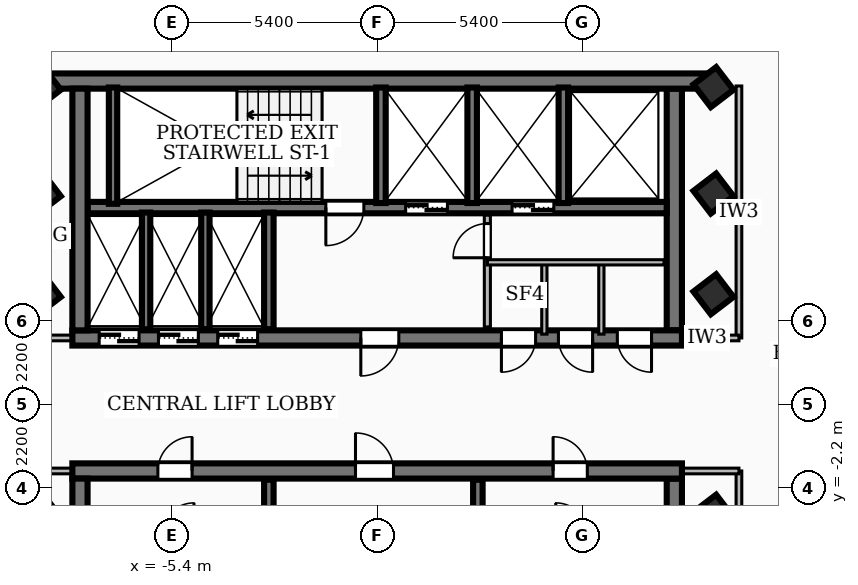
"""IFC4 building model, lengths in metres.
Left out: names, types, materials, properties, quantities, classifications, styles, units other than length and angle.
Written with IfcOpenShell. Run it as: python <this file> out.ifc"""

import sys

from ifc_helpers import new_model, si_unit, direction, frame, frame_2d, origin, origin_2d, place, context, subcontext, project, spatial, rectangle, extrude, element, fill, save


model = new_model("IFC4")
c1 = context("Model", 3, precision=1e-05, world=origin(), true_north=direction((0.0, 1.0)))
c2 = subcontext(c1, "Body", "Model", "MODEL_VIEW")
j1 = project(units=[si_unit("LENGTHUNIT", "METRE"), si_unit("PLANEANGLEUNIT", "RADIAN")], contexts=[c1])
p1 = place(None, origin())
s1 = spatial("IfcSite", under=j1, at=p1, CompositionType="ELEMENT")
p2 = place(p1, origin())
s2 = spatial("IfcBuilding", under=s1, at=p2, CompositionType="ELEMENT")
p3 = place(p2, frame((0.0, 0.0, 229.14)))
s3 = spatial("IfcBuildingStorey", under=s2, at=p3, CompositionType="ELEMENT", Elevation=229.14)
p4 = place(p3, frame((-8.78, 8.51, 0.0), z_axis=(0.0, 0.0, 1.0), x_axis=(1.0, 0.0, 0.0)))
e1 = element("IfcWall", 1, at=p4, inside=s3, PredefinedType="SHEAR", context=c2, shape_type="SweptSolid", body=[
    extrude(rectangle(XDim=17.56, YDim=0.4, at=frame_2d((8.78, 0.0))), origin(), (0.0, 0.0, 1.0), 3.14),
])
p5 = place(p3, frame((8.02, 1.75, 0.0), z_axis=(0.0, 0.0, 1.0), x_axis=(-1.0, 0.0, 0.0)))
e2 = element("IfcWall", 2, at=p5, inside=s3, PredefinedType="SHEAR", context=c2, shape_type="SweptSolid", body=[
    extrude(rectangle(XDim=16.04, YDim=0.4, at=frame_2d((8.02, 0.0))), origin(), (0.0, 0.0, 1.0), 3.14),
])
p6 = place(p5, frame((7.45, 0.0, 0.0)))
e3 = element("IfcOpeningElement", 3, at=p6, cuts=e2, PredefinedType="OPENING", context=c2, shape_type="SweptSolid", body=[
    extrude(rectangle(XDim=1.0, YDim=2.1, at=frame_2d((0.5, 1.05))), frame((0.0, 0.21, 0.0), z_axis=(0.0, -1.0, 0.0), x_axis=(1.0, 0.0, 0.0)), (0.0, 0.0, 1.0), 0.42),
])
p7 = place(p5, frame((14.285, 0.0, 0.0)))
e4 = element("IfcOpeningElement", 4, at=p7, cuts=e2, PredefinedType="OPENING", context=c2, shape_type="SweptSolid", body=[
    extrude(rectangle(XDim=1.05, YDim=2.15, at=frame_2d((0.525, 1.075))), frame((0.0, 0.21, 0.0), z_axis=(0.0, -1.0, 0.0), x_axis=(1.0, 0.0, 0.0)), (0.0, 0.0, 1.0), 0.42),
])
p8 = place(p5, frame((12.725, 0.0, 0.0)))
e5 = element("IfcOpeningElement", 5, at=p8, cuts=e2, PredefinedType="OPENING", context=c2, shape_type="SweptSolid", body=[
    extrude(rectangle(XDim=1.05, YDim=2.15, at=frame_2d((0.525, 1.075))), frame((0.0, 0.21, 0.0), z_axis=(0.0, -1.0, 0.0), x_axis=(1.0, 0.0, 0.0)), (0.0, 0.0, 1.0), 0.42),
])
p9 = place(p5, frame((11.165, 0.0, 0.0)))
e6 = element("IfcOpeningElement", 6, at=p9, cuts=e2, PredefinedType="OPENING", context=c2, shape_type="SweptSolid", body=[
    extrude(rectangle(XDim=1.05, YDim=2.15, at=frame_2d((0.525, 1.075))), frame((0.0, 0.21, 0.0), z_axis=(0.0, -1.0, 0.0), x_axis=(1.0, 0.0, 0.0)), (0.0, 0.0, 1.0), 0.42),
])
p10 = place(p5, frame((3.85, 0.0, 0.0)))
e7 = element("IfcOpeningElement", 7, at=p10, cuts=e2, PredefinedType="OPENING", context=c2, shape_type="SweptSolid", body=[
    extrude(rectangle(XDim=0.9, YDim=2.06, at=frame_2d((0.45, 1.03))), frame((0.0, 0.21, 0.0), z_axis=(0.0, -1.0, 0.0), x_axis=(1.0, 0.0, 0.0)), (0.0, 0.0, 1.0), 0.42),
])
p11 = place(p5, frame((2.35, 0.0, 0.0)))
e8 = element("IfcOpeningElement", 8, at=p11, cuts=e2, PredefinedType="OPENING", context=c2, shape_type="SweptSolid", body=[
    extrude(rectangle(XDim=0.9, YDim=2.06, at=frame_2d((0.45, 1.03))), frame((0.0, 0.21, 0.0), z_axis=(0.0, -1.0, 0.0), x_axis=(1.0, 0.0, 0.0)), (0.0, 0.0, 1.0), 0.42),
])
p12 = place(p5, frame((0.8, 0.0, 0.0)))
e9 = element("IfcOpeningElement", 9, at=p12, cuts=e2, PredefinedType="OPENING", context=c2, shape_type="SweptSolid", body=[
    extrude(rectangle(XDim=0.9, YDim=2.06, at=frame_2d((0.45, 1.03))), frame((0.0, 0.21, 0.0), z_axis=(0.0, -1.0, 0.0), x_axis=(1.0, 0.0, 0.0)), (0.0, 0.0, 1.0), 0.42),
])
for number, where, z_axis, x_axis in (
    (10, (-7.82, 1.95, 0.0), (0.0, 0.0, 1.0), (0.0, 1.0, 0.0)),
    (11, (7.82, 8.31, 0.0), (0.0, 0.0, 1.0), (0.0, -1.0, 0.0)),
):
    element("IfcWall", number, at=place(p3, frame(where, z_axis=z_axis, x_axis=x_axis)), inside=s3, PredefinedType="SHEAR", context=c2, shape_type="SweptSolid", body=[
        extrude(rectangle(XDim=6.36, YDim=0.4, at=frame_2d((3.18, 0.0))), origin(), (0.0, 0.0, 1.0), 3.14),
    ])
p13 = place(p3, frame((7.62, 5.18, 0.0), z_axis=(0.0, 0.0, 1.0), x_axis=(-1.0, 0.0, 0.0)))
e12 = element("IfcWall", 12, at=p13, inside=s3, PredefinedType="SOLIDWALL", context=c2, shape_type="SweptSolid", body=[
    extrude(rectangle(XDim=15.24, YDim=0.3, at=frame_2d((7.62, 0.0))), origin(), (0.0, 0.0, 1.0), 3.14),
])
p14 = place(p13, frame((5.77, 0.0, 0.0)))
e13 = element("IfcOpeningElement", 13, at=p14, cuts=e12, PredefinedType="OPENING", context=c2, shape_type="SweptSolid", body=[
    extrude(rectangle(XDim=1.1, YDim=2.15, at=frame_2d((0.55, 1.075))), frame((0.0, 0.16, 0.0), z_axis=(0.0, -1.0, 0.0), x_axis=(1.0, 0.0, 0.0)), (0.0, 0.0, 1.0), 0.32),
])
p15 = place(p13, frame((2.97, 0.0, 0.0)))
e14 = element("IfcOpeningElement", 14, at=p15, cuts=e12, PredefinedType="OPENING", context=c2, shape_type="SweptSolid", body=[
    extrude(rectangle(XDim=1.1, YDim=2.15, at=frame_2d((0.55, 1.075))), frame((0.0, 0.16, 0.0), z_axis=(0.0, -1.0, 0.0), x_axis=(1.0, 0.0, 0.0)), (0.0, 0.0, 1.0), 0.32),
])
p16 = place(p13, frame((7.97, 0.0, 0.0)))
e15 = element("IfcOpeningElement", 15, at=p16, cuts=e12, PredefinedType="OPENING", context=c2, shape_type="SweptSolid", body=[
    extrude(rectangle(XDim=1.0, YDim=2.1, at=frame_2d((0.5, 1.05))), frame((0.0, 0.16, 0.0), z_axis=(0.0, -1.0, 0.0), x_axis=(1.0, 0.0, 0.0)), (0.0, 0.0, 1.0), 0.32),
])
p17 = place(p3, frame((-8.02, -1.75, 0.0), z_axis=(0.0, 0.0, 1.0), x_axis=(1.0, 0.0, 0.0)))
e16 = element("IfcWall", 16, at=p17, inside=s3, PredefinedType="SHEAR", context=c2, shape_type="SweptSolid", body=[
    extrude(rectangle(XDim=16.04, YDim=0.4, at=frame_2d((8.02, 0.0))), origin(), (0.0, 0.0, 1.0), 3.14),
])
p18 = place(p17, frame((7.45, 0.0, 0.0)))
e17 = element("IfcOpeningElement", 17, at=p18, cuts=e16, PredefinedType="OPENING", context=c2, shape_type="SweptSolid", body=[
    extrude(rectangle(XDim=1.0, YDim=2.1, at=frame_2d((0.5, 1.05))), frame((0.0, 0.21, 0.0), z_axis=(0.0, -1.0, 0.0), x_axis=(1.0, 0.0, 0.0)), (0.0, 0.0, 1.0), 0.42),
])
p19 = place(p17, frame((12.65, 0.0, 0.0)))
e18 = element("IfcOpeningElement", 18, at=p19, cuts=e16, PredefinedType="OPENING", context=c2, shape_type="SweptSolid", body=[
    extrude(rectangle(XDim=0.9, YDim=2.06, at=frame_2d((0.45, 1.03))), frame((0.0, 0.21, 0.0), z_axis=(0.0, -1.0, 0.0), x_axis=(1.0, 0.0, 0.0)), (0.0, 0.0, 1.0), 0.42),
])
p20 = place(p17, frame((2.25, 0.0, 0.0)))
e19 = element("IfcOpeningElement", 19, at=p20, cuts=e16, PredefinedType="OPENING", context=c2, shape_type="SweptSolid", body=[
    extrude(rectangle(XDim=0.9, YDim=2.06, at=frame_2d((0.45, 1.03))), frame((0.0, 0.21, 0.0), z_axis=(0.0, -1.0, 0.0), x_axis=(1.0, 0.0, 0.0)), (0.0, 0.0, 1.0), 0.42),
])
for number, where, z_axis, x_axis in (
    (20, (-7.82, -8.31, 0.0), (0.0, 0.0, 1.0), (0.0, 1.0, 0.0)),
    (21, (7.82, -1.95, 0.0), (0.0, 0.0, 1.0), (0.0, -1.0, 0.0)),
):
    element("IfcWall", number, at=place(p3, frame(where, z_axis=z_axis, x_axis=x_axis)), inside=s3, PredefinedType="SHEAR", context=c2, shape_type="SweptSolid", body=[
        extrude(rectangle(XDim=6.36, YDim=0.4, at=frame_2d((3.18, 0.0))), origin(), (0.0, 0.0, 1.0), 3.14),
    ])
p21 = place(p3, frame((-6.95, 5.28, 0.0), z_axis=(0.0, 0.0, 1.0), x_axis=(0.0, 1.0, 0.0)))
e22 = element("IfcWall", 22, at=p21, inside=s3, PredefinedType="SOLIDWALL", context=c2, shape_type="SweptSolid", body=[
    extrude(rectangle(XDim=3.06, YDim=0.22, at=frame_2d((1.53, 0.0))), origin(), (0.0, 0.0, 1.0), 3.14),
])
for number, where, z_axis, x_axis in (
    (23, (0.1, 5.3, 0.0), (0.0, 0.0, 1.0), (0.0, 1.0, 0.0)),
    (24, (2.5, 5.3, 0.0), (0.0, 0.0, 1.0), (0.0, 1.0, 0.0)),
    (25, (4.9, 5.3, 0.0), (0.0, 0.0, 1.0), (0.0, 1.0, 0.0)),
):
    element("IfcWall", number, at=place(p3, frame(where, z_axis=z_axis, x_axis=x_axis)), inside=s3, PredefinedType="SOLIDWALL", context=c2, shape_type="SweptSolid", body=[
        extrude(rectangle(XDim=3.04, YDim=0.25, at=frame_2d((1.52, 0.0))), origin(), (0.0, 0.0, 1.0), 3.14),
    ])
for number, where, z_axis, x_axis in (
    (26, (-2.85, 1.98, 0.0), (0.0, 0.0, 1.0), (0.0, 1.0, 0.0)),
    (27, (-2.85, -5.05, 0.0), (0.0, 0.0, 1.0), (0.0, 1.0, 0.0)),
    (28, (2.65, -5.05, 0.0), (0.0, 0.0, 1.0), (0.0, 1.0, 0.0)),
):
    element("IfcWall", number, at=place(p3, frame(where, z_axis=z_axis, x_axis=x_axis)), inside=s3, PredefinedType="SOLIDWALL", context=c2, shape_type="SweptSolid", body=[
        extrude(rectangle(XDim=3.07, YDim=0.25, at=frame_2d((1.535, 0.0))), origin(), (0.0, 0.0, 1.0), 3.14),
    ])
for number, where, z_axis, x_axis in (
    (29, (-6.08, 1.98, 0.0), (0.0, 0.0, 1.0), (0.0, 1.0, 0.0)),
    (30, (-4.52, 1.98, 0.0), (0.0, 0.0, 1.0), (0.0, 1.0, 0.0)),
):
    element("IfcWall", number, at=place(p3, frame(where, z_axis=z_axis, x_axis=x_axis)), inside=s3, PredefinedType="SOLIDWALL", context=c2, shape_type="SweptSolid", body=[
        extrude(rectangle(XDim=3.07, YDim=0.22, at=frame_2d((1.535, 0.0))), origin(), (0.0, 0.0, 1.0), 3.14),
    ])
for number, where, z_axis, x_axis in (
    (31, (-8.85, -2.9, 0.0), (0.0, 0.0, 1.0), (0.794, 0.607, 0.0)),
    (32, (-8.85, 2.9, 0.0), (0.0, 0.0, 1.0), (0.794, 0.607, 0.0)),
    (33, (-8.85, 5.55, 0.0), (0.0, 0.0, 1.0), (0.794, 0.607, 0.0)),
    (34, (8.85, -2.9, 0.0), (0.0, 0.0, 1.0), (0.794, 0.607, 0.0)),
    (35, (8.85, 2.9, 0.0), (0.0, 0.0, 1.0), (0.794, 0.607, 0.0)),
    (36, (8.85, 5.55, 0.0), (0.0, 0.0, 1.0), (0.794, 0.607, 0.0)),
    (37, (-8.85, 8.35, 0.0), (0.0, 0.0, 1.0), (0.794, 0.607, 0.0)),
    (38, (8.85, 8.35, 0.0), (0.0, 0.0, 1.0), (0.794, 0.607, 0.0)),
):
    element("IfcColumn", number, at=place(p3, frame(where, z_axis=z_axis, x_axis=x_axis)), inside=s3, PredefinedType="COLUMN", context=c2, shape_type="SweptSolid", body=[
        extrude(rectangle(XDim=0.75, YDim=0.75, at=origin_2d()), origin(), (0.0, 0.0, 1.0), 3.42),
    ])
p22 = place(p3, frame((2.9, 2.04, 0.0), z_axis=(0.0, 0.0, 1.0), x_axis=(0.0, 1.0, 0.0)))
e39 = element("IfcWall", 39, at=p22, inside=s3, PredefinedType="PARTITIONING", context=c2, shape_type="SweptSolid", body=[
    extrude(rectangle(XDim=2.94, YDim=0.16, at=frame_2d((1.47, 0.0))), origin(), (0.0, 0.0, 1.0), 2.37),
])
p23 = place(p22, frame((1.82, 0.0, 0.0)))
e40 = element("IfcOpeningElement", 40, at=p23, cuts=e39, PredefinedType="OPENING", context=c2, shape_type="SweptSolid", body=[
    extrude(rectangle(XDim=0.9, YDim=2.06, at=frame_2d((0.45, 1.03))), frame((0.0, 0.09, 0.0), z_axis=(0.0, -1.0, 0.0), x_axis=(1.0, 0.0, 0.0)), (0.0, 0.0, 1.0), 0.18),
])
p24 = place(p3, frame((2.9, 3.74, 0.0), z_axis=(0.0, 0.0, 1.0), x_axis=(1.0, 0.0, 0.0)))
e41 = element("IfcWall", 41, at=p24, inside=s3, PredefinedType="PARTITIONING", context=c2, shape_type="SweptSolid", body=[
    extrude(rectangle(XDim=4.65, YDim=0.138, at=frame_2d((2.325, 0.0))), origin(), (0.0, 0.0, 1.0), 3.14),
])
for number, where, z_axis, x_axis in (
    (42, (4.4, 1.85, 0.0), (0.0, 0.0, 1.0), (0.0, 1.0, 0.0)),
    (43, (5.9, 1.85, 0.0), (0.0, 0.0, 1.0), (0.0, 1.0, 0.0)),
):
    element("IfcWall", number, at=place(p3, frame(where, z_axis=z_axis, x_axis=x_axis)), inside=s3, PredefinedType="PARTITIONING", context=c2, shape_type="SweptSolid", body=[
        extrude(rectangle(XDim=1.89, YDim=0.138, at=frame_2d((0.945, 0.0))), origin(), (0.0, 0.0, 1.0), 2.37),
    ])
for number, where, z_axis, x_axis in (
    (44, (-7.85, 1.75, 0.0), (0.0, 0.0, 1.0), (-1.0, 0.0, 0.0)),
    (45, (-7.85, -1.75, 0.0), (0.0, 0.0, 1.0), (-1.0, 0.0, 0.0)),
):
    element("IfcWall", number, at=place(p3, frame(where, z_axis=z_axis, x_axis=x_axis)), inside=s3, PredefinedType="PARTITIONING", context=c2, shape_type="SweptSolid", body=[
        extrude(rectangle(XDim=1.67, YDim=0.15, at=frame_2d((0.835, 0.0))), origin(), (0.0, 0.0, 1.0), 2.37),
    ])
p25 = place(p3, frame((9.52, 1.75, 0.0), z_axis=(0.0, 0.0, 1.0), x_axis=(0.0, 1.0, 0.0)))
e46 = element("IfcWall", 46, at=p25, inside=s3, PredefinedType="PARTITIONING", context=c2, shape_type="SweptSolid", body=[
    extrude(rectangle(XDim=6.63, YDim=0.15, at=frame_2d((3.315, 0.0))), origin(), (0.0, 0.0, 1.0), 2.51),
])
p26 = place(p3, frame((7.85, 1.75, 0.0), z_axis=(0.0, 0.0, 1.0), x_axis=(1.0, 0.0, 0.0)))
e47 = element("IfcWall", 47, at=p26, inside=s3, PredefinedType="PARTITIONING", context=c2, shape_type="SweptSolid", body=[
    extrude(rectangle(XDim=1.67, YDim=0.15, at=frame_2d((0.835, 0.0))), origin(), (0.0, 0.0, 1.0), 2.37),
])
p27 = place(p3, frame((9.52, -8.38, 0.0), z_axis=(0.0, 0.0, 1.0), x_axis=(0.0, 1.0, 0.0)))
e48 = element("IfcWall", 48, at=p27, inside=s3, PredefinedType="PARTITIONING", context=c2, shape_type="SweptSolid", body=[
    extrude(rectangle(XDim=6.63, YDim=0.15, at=frame_2d((3.315, 0.0))), origin(), (0.0, 0.0, 1.0), 3.14),
])
p28 = place(p3, frame((7.85, -1.75, 0.0), z_axis=(0.0, 0.0, 1.0), x_axis=(1.0, 0.0, 0.0)))
e49 = element("IfcWall", 49, at=p28, inside=s3, PredefinedType="PARTITIONING", context=c2, shape_type="SweptSolid", body=[
    extrude(rectangle(XDim=1.67, YDim=0.15, at=frame_2d((0.835, 0.0))), origin(), (0.0, 0.0, 1.0), 2.37),
])
p29 = place(p3, frame((9.996, 15.491, 0.0), z_axis=(0.0, 0.0, 1.0), x_axis=(0.607384628916, -0.794407900613, 0.0)))
e50 = element("IfcWall", 50, at=p29, inside=s3, PredefinedType="PARTITIONING", context=c2, shape_type="SweptSolid", body=[
    extrude(rectangle(XDim=13.01, YDim=0.12, at=frame_2d((6.505, 0.0))), origin(), (0.0, 0.0, 1.0), 2.51),
])
p30 = place(p29, frame((6.655, 0.0, 0.0)))
e51 = element("IfcOpeningElement", 51, at=p30, cuts=e50, PredefinedType="OPENING", context=c2, shape_type="SweptSolid", body=[
    extrude(rectangle(XDim=0.86, YDim=2.04, at=frame_2d((0.43, 1.02))), frame((0.0, 0.07, 0.0), z_axis=(0.0, -1.0, 0.0), x_axis=(1.0, 0.0, 0.0)), (0.0, 0.0, 1.0), 0.14),
])
p31 = place(p29, frame((5.455, 0.0, 0.0)))
e52 = element("IfcOpeningElement", 52, at=p31, cuts=e50, PredefinedType="OPENING", context=c2, shape_type="SweptSolid", body=[
    extrude(rectangle(XDim=0.86, YDim=2.04, at=frame_2d((0.43, 1.02))), frame((0.0, 0.07, 0.0), z_axis=(0.0, -1.0, 0.0), x_axis=(1.0, 0.0, 0.0)), (0.0, 0.0, 1.0), 0.14),
])
p32 = place(p3, frame((-17.068, 4.939, 0.0), z_axis=(0.0, 0.0, 1.0), x_axis=(0.794433927634, 0.607350586255, 0.0)))
e53 = element("IfcWall", 53, at=p32, inside=s3, PredefinedType="PARTITIONING", context=c2, shape_type="SweptSolid", body=[
    extrude(rectangle(XDim=20.58, YDim=0.12, at=frame_2d((10.29, 0.0))), origin(), (0.0, 0.0, 1.0), 2.51),
])
p33 = place(p32, frame((9.96, 0.0, 0.0)))
e54 = element("IfcOpeningElement", 54, at=p33, cuts=e53, PredefinedType="OPENING", context=c2, shape_type="SweptSolid", body=[
    extrude(rectangle(XDim=1.2, YDim=2.1, at=frame_2d((0.6, 1.05))), frame((0.0, 0.07, 0.0), z_axis=(0.0, -1.0, 0.0), x_axis=(1.0, 0.0, 0.0)), (0.0, 0.0, 1.0), 0.14),
])
p34 = place(p3, frame((-4.433, 16.952, 0.0), z_axis=(0.0, 0.0, 1.0), x_axis=(-0.794407900613, -0.607384628916, 0.0)))
e55 = element("IfcWall", 55, at=p34, inside=s3, PredefinedType="PARTITIONING", context=c2, shape_type="SweptSolid", body=[
    extrude(rectangle(XDim=13.01, YDim=0.12, at=frame_2d((6.505, 0.0))), origin(), (0.0, 0.0, 1.0), 3.14),
])
p35 = place(p34, frame((5.625, 0.0, 0.0)))
e56 = element("IfcOpeningElement", 56, at=p35, cuts=e55, PredefinedType="OPENING", context=c2, shape_type="SweptSolid", body=[
    extrude(rectangle(XDim=0.86, YDim=2.04, at=frame_2d((0.43, 1.02))), frame((0.0, 0.07, 0.0), z_axis=(0.0, -1.0, 0.0), x_axis=(1.0, 0.0, 0.0)), (0.0, 0.0, 1.0), 0.14),
])
p36 = place(p34, frame((7.065, 0.0, 0.0)))
e57 = element("IfcOpeningElement", 57, at=p36, cuts=e55, PredefinedType="OPENING", context=c2, shape_type="SweptSolid", body=[
    extrude(rectangle(XDim=0.86, YDim=2.04, at=frame_2d((0.43, 1.02))), frame((0.0, 0.07, 0.0), z_axis=(0.0, -1.0, 0.0), x_axis=(1.0, 0.0, 0.0)), (0.0, 0.0, 1.0), 0.14),
])
p37 = place(p6, origin())
e58 = element("IfcDoor", 58, at=p37, inside=s3, OperationType="SINGLE_SWING_RIGHT", PredefinedType="DOOR", context=c2, shape_type="SweptSolid", body=[
    extrude(rectangle(XDim=1.0, YDim=2.1, at=frame_2d((0.5, 1.05))), frame((0.0, 0.025, 0.0), z_axis=(0.0, -1.0, 0.0), x_axis=(1.0, 0.0, 0.0)), (0.0, 0.0, 1.0), 0.05),
])
fill(e3, e58)
p38 = place(p18, origin())
e59 = element("IfcDoor", 59, at=p38, inside=s3, OperationType="SINGLE_SWING_LEFT", PredefinedType="DOOR", context=c2, shape_type="SweptSolid", body=[
    extrude(rectangle(XDim=1.0, YDim=2.1, at=frame_2d((0.5, 1.05))), frame((0.0, 0.025, 0.0), z_axis=(0.0, -1.0, 0.0), x_axis=(1.0, 0.0, 0.0)), (0.0, 0.0, 1.0), 0.05),
])
fill(e17, e59)
p39 = place(p14, origin())
e60 = element("IfcDoor", 60, at=p39, inside=s3, OperationType="DOUBLE_DOOR_SLIDING", PredefinedType="DOOR", context=c2, shape_type="SweptSolid", body=[
    extrude(rectangle(XDim=1.1, YDim=2.15, at=frame_2d((0.55, 1.075))), frame((0.0, 0.025, 0.0), z_axis=(0.0, -1.0, 0.0), x_axis=(1.0, 0.0, 0.0)), (0.0, 0.0, 1.0), 0.05),
])
fill(e13, e60)
p40 = place(p15, origin())
e61 = element("IfcDoor", 61, at=p40, inside=s3, OperationType="DOUBLE_DOOR_SLIDING", PredefinedType="DOOR", context=c2, shape_type="SweptSolid", body=[
    extrude(rectangle(XDim=1.1, YDim=2.15, at=frame_2d((0.55, 1.075))), frame((0.0, 0.025, 0.0), z_axis=(0.0, -1.0, 0.0), x_axis=(1.0, 0.0, 0.0)), (0.0, 0.0, 1.0), 0.05),
])
fill(e14, e61)
p41 = place(p16, origin())
e62 = element("IfcDoor", 62, at=p41, inside=s3, OperationType="SINGLE_SWING_RIGHT", PredefinedType="DOOR", context=c2, shape_type="SweptSolid", body=[
    extrude(rectangle(XDim=1.0, YDim=2.1, at=frame_2d((0.5, 1.05))), frame((0.0, 0.025, 0.0), z_axis=(0.0, -1.0, 0.0), x_axis=(1.0, 0.0, 0.0)), (0.0, 0.0, 1.0), 0.05),
])
fill(e15, e62)
p42 = place(p7, origin())
e63 = element("IfcDoor", 63, at=p42, inside=s3, OperationType="DOUBLE_DOOR_SLIDING", PredefinedType="DOOR", context=c2, shape_type="SweptSolid", body=[
    extrude(rectangle(XDim=1.05, YDim=2.15, at=frame_2d((0.525, 1.075))), frame((0.0, 0.025, 0.0), z_axis=(0.0, -1.0, 0.0), x_axis=(1.0, 0.0, 0.0)), (0.0, 0.0, 1.0), 0.05),
])
fill(e4, e63)
p43 = place(p8, origin())
e64 = element("IfcDoor", 64, at=p43, inside=s3, OperationType="DOUBLE_DOOR_SLIDING", PredefinedType="DOOR", context=c2, shape_type="SweptSolid", body=[
    extrude(rectangle(XDim=1.05, YDim=2.15, at=frame_2d((0.525, 1.075))), frame((0.0, 0.025, 0.0), z_axis=(0.0, -1.0, 0.0), x_axis=(1.0, 0.0, 0.0)), (0.0, 0.0, 1.0), 0.05),
])
fill(e5, e64)
p44 = place(p9, origin())
e65 = element("IfcDoor", 65, at=p44, inside=s3, OperationType="DOUBLE_DOOR_SLIDING", PredefinedType="DOOR", context=c2, shape_type="SweptSolid", body=[
    extrude(rectangle(XDim=1.05, YDim=2.15, at=frame_2d((0.525, 1.075))), frame((0.0, 0.025, 0.0), z_axis=(0.0, -1.0, 0.0), x_axis=(1.0, 0.0, 0.0)), (0.0, 0.0, 1.0), 0.05),
])
fill(e6, e65)
p45 = place(p19, origin())
e66 = element("IfcDoor", 66, at=p45, inside=s3, OperationType="SINGLE_SWING_LEFT", PredefinedType="DOOR", context=c2, shape_type="SweptSolid", body=[
    extrude(rectangle(XDim=0.9, YDim=2.06, at=frame_2d((0.45, 1.03))), frame((0.0, 0.025, 0.0), z_axis=(0.0, -1.0, 0.0), x_axis=(1.0, 0.0, 0.0)), (0.0, 0.0, 1.0), 0.05),
])
fill(e18, e66)
p46 = place(p20, origin())
e67 = element("IfcDoor", 67, at=p46, inside=s3, OperationType="SINGLE_SWING_RIGHT", PredefinedType="DOOR", context=c2, shape_type="SweptSolid", body=[
    extrude(rectangle(XDim=0.9, YDim=2.06, at=frame_2d((0.45, 1.03))), frame((0.0, 0.025, 0.0), z_axis=(0.0, -1.0, 0.0), x_axis=(1.0, 0.0, 0.0)), (0.0, 0.0, 1.0), 0.05),
])
fill(e19, e67)
p47 = place(p10, origin())
e68 = element("IfcDoor", 68, at=p47, inside=s3, OperationType="SINGLE_SWING_RIGHT", PredefinedType="DOOR", context=c2, shape_type="SweptSolid", body=[
    extrude(rectangle(XDim=0.9, YDim=2.06, at=frame_2d((0.45, 1.03))), frame((0.0, 0.025, 0.0), z_axis=(0.0, -1.0, 0.0), x_axis=(1.0, 0.0, 0.0)), (0.0, 0.0, 1.0), 0.05),
])
fill(e7, e68)
p48 = place(p11, origin())
e69 = element("IfcDoor", 69, at=p48, inside=s3, OperationType="SINGLE_SWING_LEFT", PredefinedType="DOOR", context=c2, shape_type="SweptSolid", body=[
    extrude(rectangle(XDim=0.9, YDim=2.06, at=frame_2d((0.45, 1.03))), frame((0.0, 0.025, 0.0), z_axis=(0.0, -1.0, 0.0), x_axis=(1.0, 0.0, 0.0)), (0.0, 0.0, 1.0), 0.05),
])
fill(e8, e69)
p49 = place(p12, origin())
e70 = element("IfcDoor", 70, at=p49, inside=s3, OperationType="SINGLE_SWING_LEFT", PredefinedType="DOOR", context=c2, shape_type="SweptSolid", body=[
    extrude(rectangle(XDim=0.9, YDim=2.06, at=frame_2d((0.45, 1.03))), frame((0.0, 0.025, 0.0), z_axis=(0.0, -1.0, 0.0), x_axis=(1.0, 0.0, 0.0)), (0.0, 0.0, 1.0), 0.05),
])
fill(e9, e70)
p50 = place(p23, origin())
e71 = element("IfcDoor", 71, at=p50, inside=s3, OperationType="SINGLE_SWING_LEFT", PredefinedType="DOOR", context=c2, shape_type="SweptSolid", body=[
    extrude(rectangle(XDim=0.9, YDim=2.06, at=frame_2d((0.45, 1.03))), frame((0.0, 0.025, 0.0), z_axis=(0.0, -1.0, 0.0), x_axis=(1.0, 0.0, 0.0)), (0.0, 0.0, 1.0), 0.05),
])
fill(e40, e71)
save(model, sys.argv[1])
